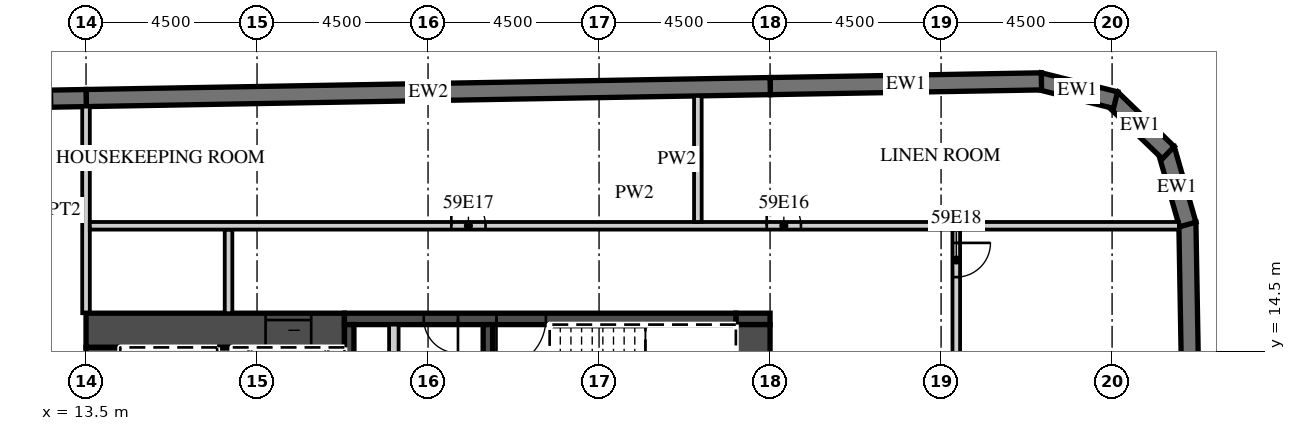
"""IFC4 building model, lengths in metres.
Left out: names, types, materials, properties, quantities, classifications, styles, units other than length and angle.
Written with IfcOpenShell. Run it as: python <this file> out.ifc"""

import sys

from ifc_helpers import new_model, si_unit, direction, frame, frame_2d, origin, place, context, subcontext, project, spatial, polyline, rectangle, outline, extrude, element, fill, save


model = new_model("IFC4")
c1 = context("Model", 3, precision=1e-05, world=origin(), true_north=direction((0.0, 1.0)))
c2 = subcontext(c1, "Body", "Model", "MODEL_VIEW")
j1 = project(units=[si_unit("LENGTHUNIT", "METRE"), si_unit("PLANEANGLEUNIT", "RADIAN")], contexts=[c1])
p1 = place(None, origin())
s1 = spatial("IfcSite", under=j1, at=p1, CompositionType="ELEMENT")
p2 = place(p1, origin())
s2 = spatial("IfcBuilding", under=s1, at=p2, CompositionType="ELEMENT")
p3 = place(p2, frame((0.0, 0.0, 240.8)))
s3 = spatial("IfcBuildingStorey", under=s2, at=p3, CompositionType="ELEMENT", Elevation=240.8)
p4 = place(p3, frame((43.057, -15.103, 0.0), z_axis=(0.0, 0.0, 1.0), x_axis=(-0.017452408953, 0.999847695112, 0.0)))
e1 = element("IfcWall", 1, at=p4, inside=s3, PredefinedType="SOLIDWALL", context=c2, shape_type="SweptSolid", body=[
    extrude(rectangle(XDim=33.0, YDim=0.45, at=frame_2d((16.5, 0.0))), origin(), (0.0, 0.0, 1.0), 3.02),
])
p5 = place(p3, frame((42.49, 17.833, 0.0), z_axis=(0.0, 0.0, 1.0), x_axis=(-0.275546368831, 0.961287781377, 0.0)))
e2 = element("IfcWall", 2, at=p5, inside=s3, PredefinedType="SOLIDWALL", context=c2, shape_type="SweptSolid", body=[
    extrude(outline(polyline([(0.0, -0.225), (2.071, -0.225), (1.95, 0.225), (0.121, 0.225), (0.0, -0.225)])), origin(), (0.0, 0.0, 1.0), 3.02),
])
p6 = place(p3, frame((41.979, 19.724, 0.0), z_axis=(0.0, 0.0, 1.0), x_axis=(-0.719379111448, 0.694617660308, 0.0)))
e3 = element("IfcWall", 3, at=p6, inside=s3, PredefinedType="SOLIDWALL", context=c2, shape_type="SweptSolid", body=[
    extrude(outline(polyline([(0.0, -0.225), (2.071, -0.225), (1.95, 0.225), (0.121, 0.225), (0.0, -0.225)])), origin(), (0.0, 0.0, 1.0), 3.02),
])
p7 = place(p3, frame((40.591, 21.106, 0.0), z_axis=(0.0, 0.0, 1.0), x_axis=(-0.970287979719, 0.241952963225, 0.0)))
e4 = element("IfcWall", 4, at=p7, inside=s3, PredefinedType="SOLIDWALL", context=c2, shape_type="SweptSolid", body=[
    extrude(outline(polyline([(0.0, -0.225), (2.071, -0.225), (1.95, 0.225), (0.121, 0.225), (0.0, -0.225)])), origin(), (0.0, 0.0, 1.0), 3.02),
])
p8 = place(p3, frame((38.641, 21.6, 0.0), z_axis=(0.0, 0.0, 1.0), x_axis=(-0.999847245074, -0.017478172627, 0.0)))
e5 = element("IfcWall", 5, at=p8, inside=s3, PredefinedType="SOLIDWALL", context=c2, shape_type="SweptSolid", body=[
    extrude(rectangle(XDim=7.138, YDim=0.45, at=frame_2d((3.569, 0.0))), origin(), (0.0, 0.0, 1.0), 3.02),
])
p9 = place(p3, frame((31.504, 21.476, 0.0), z_axis=(0.0, 0.0, 1.0), x_axis=(-0.999847677887, -0.017453395744, 0.0)))
e6 = element("IfcWall", 6, at=p9, inside=s3, PredefinedType="SOLIDWALL", context=c2, shape_type="SweptSolid", body=[
    extrude(rectangle(XDim=18.003, YDim=0.45, at=frame_2d((9.001, 0.0))), origin(), (0.0, 0.0, 1.0), 3.02),
])
p10 = place(p3, frame((13.504, 21.161, 0.0), z_axis=(0.0, 0.0, 1.0), x_axis=(-0.999847763257, -0.017448504532, 0.0)))
e7 = element("IfcWall", 7, at=p10, inside=s3, PredefinedType="SOLIDWALL", context=c2, shape_type="SweptSolid", body=[
    extrude(rectangle(XDim=46.859, YDim=0.45, at=frame_2d((23.43, 0.0))), origin(), (0.0, 0.0, 1.0), 3.02),
])
p11 = place(p10, frame((0.9, 0.0, 0.45)))
e8 = element("IfcOpeningElement", 8, at=p11, cuts=e7, PredefinedType="OPENING", context=c2, shape_type="SweptSolid", body=[
    extrude(rectangle(XDim=2.7, YDim=2.25, at=frame_2d((1.35, 1.125))), frame((0.0, 0.235, 0.0), z_axis=(0.0, -1.0, 0.0), x_axis=(1.0, 0.0, 0.0)), (0.0, 0.0, 1.0), 0.47),
])
p12 = place(p10, frame((5.401, 0.0, 0.45)))
e9 = element("IfcOpeningElement", 9, at=p12, cuts=e7, PredefinedType="OPENING", context=c2, shape_type="SweptSolid", body=[
    extrude(rectangle(XDim=2.7, YDim=2.25, at=frame_2d((1.35, 1.125))), frame((0.0, 0.235, 0.0), z_axis=(0.0, -1.0, 0.0), x_axis=(1.0, 0.0, 0.0)), (0.0, 0.0, 1.0), 0.47),
])
p13 = place(p10, frame((9.902, 0.0, 0.45)))
e10 = element("IfcOpeningElement", 10, at=p13, cuts=e7, PredefinedType="OPENING", context=c2, shape_type="SweptSolid", body=[
    extrude(rectangle(XDim=2.7, YDim=2.25, at=frame_2d((1.35, 1.125))), frame((0.0, 0.235, 0.0), z_axis=(0.0, -1.0, 0.0), x_axis=(1.0, 0.0, 0.0)), (0.0, 0.0, 1.0), 0.47),
])
p14 = place(p10, frame((14.402, 0.0, 0.45)))
e11 = element("IfcOpeningElement", 11, at=p14, cuts=e7, PredefinedType="OPENING", context=c2, shape_type="SweptSolid", body=[
    extrude(rectangle(XDim=2.7, YDim=2.25, at=frame_2d((1.35, 1.125))), frame((0.0, 0.235, 0.0), z_axis=(0.0, -1.0, 0.0), x_axis=(1.0, 0.0, 0.0)), (0.0, 0.0, 1.0), 0.47),
])
p15 = place(p10, frame((18.903, 0.0, 0.45)))
e12 = element("IfcOpeningElement", 12, at=p15, cuts=e7, PredefinedType="OPENING", context=c2, shape_type="SweptSolid", body=[
    extrude(rectangle(XDim=2.7, YDim=2.25, at=frame_2d((1.35, 1.125))), frame((0.0, 0.235, 0.0), z_axis=(0.0, -1.0, 0.0), x_axis=(1.0, 0.0, 0.0)), (0.0, 0.0, 1.0), 0.47),
])
p16 = place(p10, frame((23.404, 0.0, 0.45)))
e13 = element("IfcOpeningElement", 13, at=p16, cuts=e7, PredefinedType="OPENING", context=c2, shape_type="SweptSolid", body=[
    extrude(rectangle(XDim=2.7, YDim=2.25, at=frame_2d((1.35, 1.125))), frame((0.0, 0.235, 0.0), z_axis=(0.0, -1.0, 0.0), x_axis=(1.0, 0.0, 0.0)), (0.0, 0.0, 1.0), 0.47),
])
p17 = place(p10, frame((27.904, 0.0, 0.45)))
e14 = element("IfcOpeningElement", 14, at=p17, cuts=e7, PredefinedType="OPENING", context=c2, shape_type="SweptSolid", body=[
    extrude(rectangle(XDim=2.7, YDim=2.25, at=frame_2d((1.35, 1.125))), frame((0.0, 0.235, 0.0), z_axis=(0.0, -1.0, 0.0), x_axis=(1.0, 0.0, 0.0)), (0.0, 0.0, 1.0), 0.47),
])
p18 = place(p10, frame((32.405, 0.0, 0.45)))
e15 = element("IfcOpeningElement", 15, at=p18, cuts=e7, PredefinedType="OPENING", context=c2, shape_type="SweptSolid", body=[
    extrude(rectangle(XDim=2.7, YDim=2.25, at=frame_2d((1.35, 1.125))), frame((0.0, 0.235, 0.0), z_axis=(0.0, -1.0, 0.0), x_axis=(1.0, 0.0, 0.0)), (0.0, 0.0, 1.0), 0.47),
])
p19 = place(p10, frame((36.906, 0.0, 0.45)))
e16 = element("IfcOpeningElement", 16, at=p19, cuts=e7, PredefinedType="OPENING", context=c2, shape_type="SweptSolid", body=[
    extrude(rectangle(XDim=2.7, YDim=2.25, at=frame_2d((1.35, 1.125))), frame((0.0, 0.235, 0.0), z_axis=(0.0, -1.0, 0.0), x_axis=(1.0, 0.0, 0.0)), (0.0, 0.0, 1.0), 0.47),
])
p20 = place(p10, frame((41.406, 0.0, 0.45)))
e17 = element("IfcOpeningElement", 17, at=p20, cuts=e7, PredefinedType="OPENING", context=c2, shape_type="SweptSolid", body=[
    extrude(rectangle(XDim=2.7, YDim=2.25, at=frame_2d((1.35, 1.125))), frame((0.0, 0.235, 0.0), z_axis=(0.0, -1.0, 0.0), x_axis=(1.0, 0.0, 0.0)), (0.0, 0.0, 1.0), 0.47),
])
p21 = place(p3, frame((13.5, 15.5, 0.0), z_axis=(0.0, 0.0, 1.0), x_axis=(0.0, 1.0, 0.0)))
e18 = element("IfcWall", 18, at=p21, inside=s3, PredefinedType="PARTITIONING", context=c2, shape_type="SweptSolid", body=[
    extrude(rectangle(XDim=5.436, YDim=0.2, at=frame_2d((2.718, 0.0))), origin(), (0.0, 0.0, 1.0), 3.02),
])
p22 = place(p3, frame((13.5, 15.05, 0.0), z_axis=(0.0, 0.0, 1.0), x_axis=(1.0, 0.0, 0.0)))
e19 = element("IfcWall", 19, at=p22, inside=s3, PredefinedType="SHEAR", context=c2, shape_type="SweptSolid", body=[
    extrude(rectangle(XDim=6.8, YDim=0.9, at=frame_2d((3.4, 0.0))), origin(), (0.0, 0.0, 1.0), 3.02),
])
p23 = place(p22, frame((4.725, 0.0, 0.0)))
e20 = element("IfcOpeningElement", 20, at=p23, cuts=e19, PredefinedType="OPENING", context=c2, shape_type="SweptSolid", body=[
    extrude(rectangle(XDim=1.2, YDim=2.1, at=frame_2d((0.6, 1.05))), frame((0.0, 0.46, 0.0), z_axis=(0.0, -1.0, 0.0), x_axis=(1.0, 0.0, 0.0)), (0.0, 0.0, 1.0), 0.92),
])
p24 = place(p3, frame((30.6, 15.35, 0.0), z_axis=(0.0, 0.0, 1.0), x_axis=(1.0, 0.0, 0.0)))
e21 = element("IfcWall", 21, at=p24, inside=s3, PredefinedType="SHEAR", context=c2, shape_type="SweptSolid", body=[
    extrude(rectangle(XDim=0.9, YDim=0.3, at=frame_2d((0.45, 0.0))), origin(), (0.0, 0.0, 1.0), 3.02),
])
p25 = place(p3, frame((20.3, 15.35, 0.0), z_axis=(0.0, 0.0, 1.0), x_axis=(1.0, 0.0, 0.0)))
e22 = element("IfcWall", 22, at=p25, inside=s3, PredefinedType="SHEAR", context=c2, shape_type="SweptSolid", body=[
    extrude(rectangle(XDim=10.3, YDim=0.3, at=frame_2d((5.15, 0.0))), origin(), (0.0, 0.0, 1.0), 3.02),
])
p26 = place(p25, frame((4.0, 0.0, 0.0)))
e23 = element("IfcOpeningElement", 23, at=p26, cuts=e22, PredefinedType="OPENING", context=c2, shape_type="SweptSolid", body=[
    extrude(rectangle(XDim=1.3, YDim=2.1, at=frame_2d((0.65, 1.05))), frame((0.0, 0.16, 0.0), z_axis=(0.0, -1.0, 0.0), x_axis=(1.0, 0.0, 0.0)), (0.0, 0.0, 1.0), 0.32),
])
p27 = place(p25, frame((2.087, 0.0, 0.0)))
e24 = element("IfcOpeningElement", 24, at=p27, cuts=e22, PredefinedType="OPENING", context=c2, shape_type="SweptSolid", body=[
    extrude(rectangle(XDim=0.9, YDim=2.1, at=frame_2d((0.45, 1.05))), frame((0.0, 0.16, 0.0), z_axis=(0.0, -1.0, 0.0), x_axis=(1.0, 0.0, 0.0)), (0.0, 0.0, 1.0), 0.32),
])
p28 = place(p3, frame((31.05, 2.4, 0.0), z_axis=(0.0, 0.0, 1.0), x_axis=(0.0, 1.0, 0.0)))
e25 = element("IfcWall", 25, at=p28, inside=s3, PredefinedType="SHEAR", context=c2, shape_type="SweptSolid", body=[
    extrude(rectangle(XDim=12.8, YDim=0.9, at=frame_2d((6.4, 0.0))), origin(), (0.0, 0.0, 1.0), 3.02),
])
p29 = place(p28, frame((0.2, 0.0, 0.0)))
e26 = element("IfcOpeningElement", 26, at=p29, cuts=e25, PredefinedType="OPENING", context=c2, shape_type="SweptSolid", body=[
    extrude(rectangle(XDim=1.1, YDim=2.1, at=frame_2d((0.55, 1.05))), frame((0.0, 0.46, 0.0), z_axis=(0.0, -1.0, 0.0), x_axis=(1.0, 0.0, 0.0)), (0.0, 0.0, 1.0), 0.92),
])
p30 = place(p3, frame((13.95, 2.4, 0.0), z_axis=(0.0, 0.0, 1.0), x_axis=(0.0, 1.0, 0.0)))
e27 = element("IfcWall", 27, at=p30, inside=s3, PredefinedType="SHEAR", context=c2, shape_type="SweptSolid", body=[
    extrude(rectangle(XDim=12.2, YDim=0.9, at=frame_2d((6.1, 0.0))), origin(), (0.0, 0.0, 1.0), 3.02),
])
p31 = place(p3, frame((17.15, 8.8, 0.0), z_axis=(0.0, 0.0, 1.0), x_axis=(0.0, 1.0, 0.0)))
e28 = element("IfcWall", 28, at=p31, inside=s3, PredefinedType="SHEAR", context=c2, shape_type="SweptSolid", body=[
    extrude(rectangle(XDim=5.8, YDim=0.4, at=frame_2d((2.9, 0.0))), origin(), (0.0, 0.0, 1.0), 3.02),
])
for number, where, z_axis, x_axis in (
    (29, (20.425, 11.95, 0.0), (0.0, 0.0, 1.0), (0.0, 1.0, 0.0)),
    (30, (24.075, 11.95, 0.0), (0.0, 0.0, 1.0), (0.0, 1.0, 0.0)),
):
    element("IfcWall", number, at=place(p3, frame(where, z_axis=z_axis, x_axis=x_axis)), inside=s3, PredefinedType="SHEAR", context=c2, shape_type="SweptSolid", body=[
        extrude(rectangle(XDim=3.25, YDim=0.25, at=frame_2d((1.625, 0.0))), origin(), (0.0, 0.0, 1.0), 3.02),
    ])
p32 = place(p3, frame((21.6, 11.95, 0.0), z_axis=(0.0, 0.0, 1.0), x_axis=(0.0, 1.0, 0.0)))
e31 = element("IfcWall", 31, at=p32, inside=s3, PredefinedType="PARTITIONING", context=c2, shape_type="SweptSolid", body=[
    extrude(rectangle(XDim=3.25, YDim=0.25, at=frame_2d((1.625, 0.0))), origin(), (0.0, 0.0, 1.0), 3.02),
])
p33 = place(p3, frame((17.25, 15.5, 0.0), z_axis=(0.0, 0.0, 1.0), x_axis=(0.0, 1.0, 0.0)))
e32 = element("IfcWall", 32, at=p33, inside=s3, PredefinedType="PARTITIONING", context=c2, shape_type="SweptSolid", body=[
    extrude(rectangle(XDim=2.2, YDim=0.2, at=frame_2d((1.1, 0.0))), origin(), (0.0, 0.0, 1.0), 3.02),
])
p34 = place(p3, frame((36.4, 1.75, 0.0), z_axis=(0.0, 0.0, 1.0), x_axis=(0.0, 1.0, 0.0)))
e33 = element("IfcWall", 33, at=p34, inside=s3, PredefinedType="PARTITIONING", context=c2, shape_type="SweptSolid", body=[
    extrude(rectangle(XDim=15.95, YDim=0.2, at=frame_2d((7.975, 0.0))), origin(), (0.0, 0.0, 1.0), 3.02),
])
p35 = place(p34, frame((14.7, 0.0, 0.0)))
e34 = element("IfcOpeningElement", 34, at=p35, cuts=e33, PredefinedType="OPENING", context=c2, shape_type="SweptSolid", body=[
    extrude(rectangle(XDim=0.9, YDim=2.1, at=frame_2d((0.45, 1.05))), frame((0.0, 0.11, 0.0), z_axis=(0.0, -1.0, 0.0), x_axis=(1.0, 0.0, 0.0)), (0.0, 0.0, 1.0), 0.22),
])
p36 = place(p3, frame((13.6, 17.8, 0.0), z_axis=(0.0, 0.0, 1.0), x_axis=(1.0, 0.0, 0.0)))
e35 = element("IfcWall", 35, at=p36, inside=s3, PredefinedType="PARTITIONING", context=c2, shape_type="SweptSolid", body=[
    extrude(rectangle(XDim=28.657, YDim=0.2, at=frame_2d((14.329, 0.0))), origin(), (0.0, 0.0, 1.0), 3.02),
])
p37 = place(p36, frame((17.812, 0.0, 0.0)))
e36 = element("IfcOpeningElement", 36, at=p37, cuts=e35, PredefinedType="OPENING", context=c2, shape_type="SweptSolid", body=[
    extrude(rectangle(XDim=0.9, YDim=2.1, at=frame_2d((0.45, 1.05))), frame((0.0, 0.11, 0.0), z_axis=(0.0, -1.0, 0.0), x_axis=(1.0, 0.0, 0.0)), (0.0, 0.0, 1.0), 0.22),
])
p38 = place(p36, frame((9.512, 0.0, 0.0)))
e37 = element("IfcOpeningElement", 37, at=p38, cuts=e35, PredefinedType="OPENING", context=c2, shape_type="SweptSolid", body=[
    extrude(rectangle(XDim=0.9, YDim=2.1, at=frame_2d((0.45, 1.05))), frame((0.0, 0.11, 0.0), z_axis=(0.0, -1.0, 0.0), x_axis=(1.0, 0.0, 0.0)), (0.0, 0.0, 1.0), 0.22),
])
p39 = place(p3, frame((29.6, 17.9, 0.0), z_axis=(0.0, 0.0, 1.0), x_axis=(0.0, 1.0, 0.0)))
e38 = element("IfcWall", 38, at=p39, inside=s3, PredefinedType="PARTITIONING", context=c2, shape_type="SweptSolid", body=[
    extrude(rectangle(XDim=3.318, YDim=0.2, at=frame_2d((1.659, 0.0))), origin(), (0.0, 0.0, 1.0), 3.02),
])
p40 = place(p11, origin())
e39 = element("IfcWindow", 39, at=p40, inside=s3, PartitioningType="SINGLE_PANEL", PredefinedType="WINDOW", context=c2, shape_type="SweptSolid", body=[
    extrude(rectangle(XDim=2.7, YDim=2.25, at=frame_2d((1.35, 1.125))), frame((0.0, 0.09, 0.0), z_axis=(0.0, -1.0, 0.0), x_axis=(1.0, 0.0, 0.0)), (0.0, 0.0, 1.0), 0.06),
])
fill(e8, e39)
p41 = place(p23, origin())
e40 = element("IfcDoor", 40, at=p41, inside=s3, OperationType="SLIDING_TO_LEFT", PredefinedType="DOOR", context=c2, shape_type="SweptSolid", body=[
    extrude(rectangle(XDim=1.2, YDim=2.1, at=frame_2d((0.6, 1.05))), frame((0.0, 0.025, 0.0), z_axis=(0.0, -1.0, 0.0), x_axis=(1.0, 0.0, 0.0)), (0.0, 0.0, 1.0), 0.05),
])
fill(e20, e40)
p42 = place(p26, origin())
e41 = element("IfcDoor", 41, at=p42, inside=s3, OperationType="SINGLE_SWING_LEFT", PredefinedType="DOOR", context=c2, shape_type="SweptSolid", body=[
    extrude(rectangle(XDim=1.3, YDim=2.1, at=frame_2d((0.65, 1.05))), frame((0.0, 0.025, 0.0), z_axis=(0.0, -1.0, 0.0), x_axis=(1.0, 0.0, 0.0)), (0.0, 0.0, 1.0), 0.05),
])
fill(e23, e41)
p43 = place(p27, origin())
e42 = element("IfcDoor", 42, at=p43, inside=s3, OperationType="SINGLE_SWING_RIGHT", PredefinedType="DOOR", context=c2, shape_type="SweptSolid", body=[
    extrude(rectangle(XDim=0.9, YDim=2.1, at=frame_2d((0.45, 1.05))), frame((0.0, 0.025, 0.0), z_axis=(0.0, -1.0, 0.0), x_axis=(1.0, 0.0, 0.0)), (0.0, 0.0, 1.0), 0.05),
])
fill(e24, e42)
p44 = place(p37, origin())
e43 = element("IfcDoor", 43, at=p44, inside=s3, OperationType="SINGLE_SWING_LEFT", PredefinedType="DOOR", context=c2, shape_type="SweptSolid", body=[
    extrude(rectangle(XDim=0.9, YDim=2.1, at=frame_2d((0.45, 1.05))), frame((0.0, 0.025, 0.0), z_axis=(0.0, -1.0, 0.0), x_axis=(1.0, 0.0, 0.0)), (0.0, 0.0, 1.0), 0.05),
])
fill(e36, e43)
p45 = place(p38, origin())
e44 = element("IfcDoor", 44, at=p45, inside=s3, OperationType="SINGLE_SWING_LEFT", PredefinedType="DOOR", context=c2, shape_type="SweptSolid", body=[
    extrude(rectangle(XDim=0.9, YDim=2.1, at=frame_2d((0.45, 1.05))), frame((0.0, 0.025, 0.0), z_axis=(0.0, -1.0, 0.0), x_axis=(1.0, 0.0, 0.0)), (0.0, 0.0, 1.0), 0.05),
])
fill(e37, e44)
p46 = place(p35, origin())
e45 = element("IfcDoor", 45, at=p46, inside=s3, OperationType="SINGLE_SWING_RIGHT", PredefinedType="DOOR", context=c2, shape_type="SweptSolid", body=[
    extrude(rectangle(XDim=0.9, YDim=2.1, at=frame_2d((0.45, 1.05))), frame((0.0, 0.025, 0.0), z_axis=(0.0, -1.0, 0.0), x_axis=(1.0, 0.0, 0.0)), (0.0, 0.0, 1.0), 0.05),
])
fill(e34, e45)
save(model, sys.argv[1])
